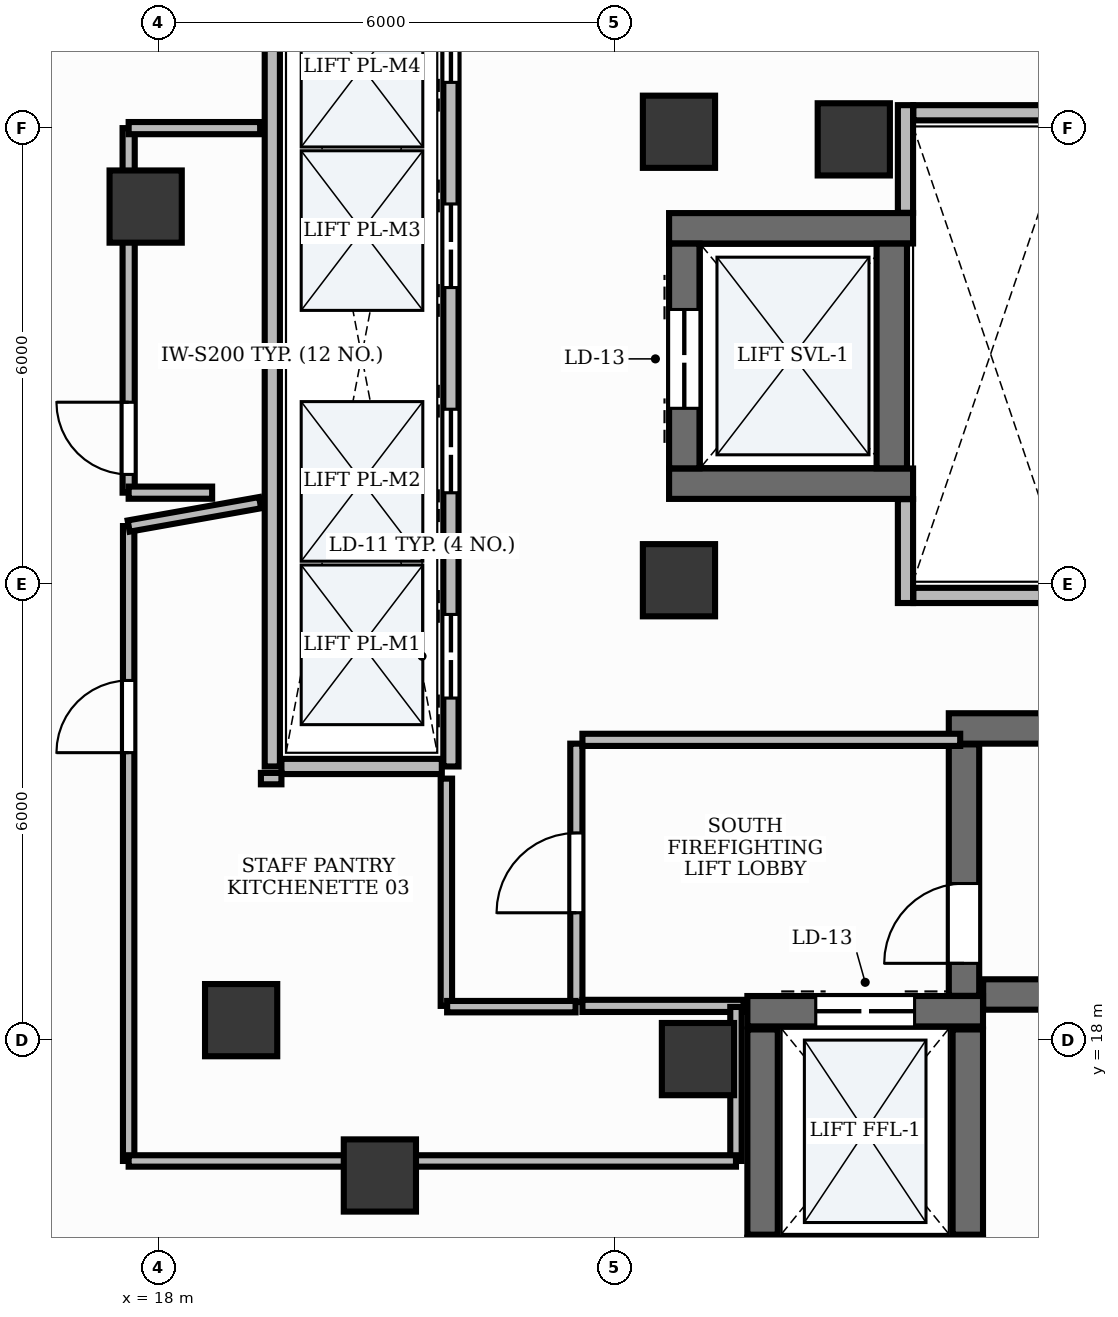
"""IFC4 building model, lengths in metres.
Left out: names, types, materials, properties, quantities, classifications, styles, units other than length and angle.
Written with IfcOpenShell. Run it as: python <this file> out.ifc"""

import sys

from ifc_helpers import new_model, si_unit, direction, frame, frame_2d, origin, origin_2d, place, context, subcontext, project, spatial, rectangle, extrude, element, fill, save


model = new_model("IFC4")
c1 = context("Model", 3, precision=1e-05, world=origin(), true_north=direction((0.0, 1.0)))
c2 = subcontext(c1, "Body", "Model", "MODEL_VIEW")
j1 = project(units=[si_unit("LENGTHUNIT", "METRE"), si_unit("PLANEANGLEUNIT", "RADIAN")], contexts=[c1])
p1 = place(None, origin())
s1 = spatial("IfcSite", under=j1, at=p1, CompositionType="ELEMENT")
p2 = place(p1, origin())
s2 = spatial("IfcBuilding", under=s1, at=p2, CompositionType="ELEMENT")
p3 = place(p2, frame((0.0, 0.0, 260.4)))
s3 = spatial("IfcBuildingStorey", under=s2, at=p3, CompositionType="ELEMENT", Elevation=260.4)
p4 = place(p3, frame((28.852, 18.6, 0.0), z_axis=(0.0, 0.0, 1.0), x_axis=(1.0, 0.0, 0.0)))
e1 = element("IfcWall", 1, at=p4, inside=s3, PredefinedType="SHEAR", context=c2, shape_type="SweptSolid", body=[
    extrude(rectangle(XDim=8.198, YDim=0.4, at=frame_2d((4.099, 0.0))), origin(), (0.0, 0.0, 1.0), 3.9),
])
p5 = place(p3, frame((28.4, 22.1, 0.0), z_axis=(0.0, 0.0, 1.0), x_axis=(1.0, 0.0, 0.0)))
e2 = element("IfcWall", 2, at=p5, inside=s3, PredefinedType="SHEAR", context=c2, shape_type="SweptSolid", body=[
    extrude(rectangle(XDim=8.65, YDim=0.4, at=frame_2d((4.325, 0.0))), origin(), (0.0, 0.0, 1.0), 3.9),
])
p6 = place(p3, frame((28.6, 18.582, 0.0), z_axis=(0.0, 0.0, 1.0), x_axis=(0.0, 1.0, 0.0)))
e3 = element("IfcWall", 3, at=p6, inside=s3, PredefinedType="SHEAR", context=c2, shape_type="SweptSolid", body=[
    extrude(rectangle(XDim=3.308, YDim=0.4, at=frame_2d((1.654, 0.0))), origin(), (0.0, 0.0, 1.0), 3.9),
])
p7 = place(p6, frame((0.428, 0.0, 0.0)))
e4 = element("IfcOpeningElement", 4, at=p7, cuts=e3, PredefinedType="OPENING", context=c2, shape_type="SweptSolid", body=[
    extrude(rectangle(XDim=1.05, YDim=2.15, at=frame_2d((0.525, 1.075))), frame((0.0, 0.215, 0.0), z_axis=(0.0, -1.0, 0.0), x_axis=(1.0, 0.0, 0.0)), (0.0, 0.0, 1.0), 0.43),
])
p8 = place(p3, frame((25.75, 18.38, 0.0), z_axis=(0.0, 0.0, 1.0), x_axis=(1.0, 0.0, 0.0)))
e5 = element("IfcWall", 5, at=p8, inside=s3, PredefinedType="SHEAR", context=c2, shape_type="SweptSolid", body=[
    extrude(rectangle(XDim=3.1, YDim=0.4, at=frame_2d((1.55, 0.0))), origin(), (0.0, 0.0, 1.0), 3.9),
])
p9 = place(p8, frame((0.9, 0.0, 0.0)))
e6 = element("IfcOpeningElement", 6, at=p9, cuts=e5, PredefinedType="OPENING", context=c2, shape_type="SweptSolid", body=[
    extrude(rectangle(XDim=1.3, YDim=2.2, at=frame_2d((0.65, 1.1))), frame((0.0, 0.215, 0.0), z_axis=(0.0, -1.0, 0.0), x_axis=(1.0, 0.0, 0.0)), (0.0, 0.0, 1.0), 0.43),
])
for number, where, z_axis, x_axis in (
    (7, (25.95, 15.44, 0.0), (0.0, 0.0, 1.0), (0.0, 1.0, 0.0)),
    (8, (28.65, 15.44, 0.0), (0.0, 0.0, 1.0), (0.0, 1.0, 0.0)),
):
    element("IfcWall", number, at=place(p3, frame(where, z_axis=z_axis, x_axis=x_axis)), inside=s3, PredefinedType="SHEAR", context=c2, shape_type="SweptSolid", body=[
        extrude(rectangle(XDim=2.7, YDim=0.4, at=frame_2d((1.35, 0.0))), origin(), (0.0, 0.0, 1.0), 3.9),
    ])
for number, where, z_axis, x_axis in (
    (9, (24.72, 28.68, 0.0), (0.0, 0.0, 1.0), (1.0, 0.0, 0.0)),
    (10, (24.72, 25.32, 0.0), (0.0, 0.0, 1.0), (1.0, 0.0, 0.0)),
):
    element("IfcWall", number, at=place(p3, frame(where, z_axis=z_axis, x_axis=x_axis)), inside=s3, PredefinedType="SHEAR", context=c2, shape_type="SweptSolid", body=[
        extrude(rectangle(XDim=3.21, YDim=0.4, at=frame_2d((1.605, 0.0))), origin(), (0.0, 0.0, 1.0), 3.9),
    ])
p10 = place(p3, frame((24.92, 25.522, 0.0), z_axis=(0.0, 0.0, 1.0), x_axis=(0.0, 1.0, 0.0)))
e11 = element("IfcWall", 11, at=p10, inside=s3, PredefinedType="SHEAR", context=c2, shape_type="SweptSolid", body=[
    extrude(rectangle(XDim=2.956, YDim=0.4, at=frame_2d((1.478, 0.0))), origin(), (0.0, 0.0, 1.0), 3.9),
])
p11 = place(p10, frame((0.79, 0.0, 0.0)))
e12 = element("IfcOpeningElement", 12, at=p11, cuts=e11, PredefinedType="OPENING", context=c2, shape_type="SweptSolid", body=[
    extrude(rectangle(XDim=1.3, YDim=2.2, at=frame_2d((0.65, 1.1))), frame((0.0, 0.215, 0.0), z_axis=(0.0, -1.0, 0.0), x_axis=(1.0, 0.0, 0.0)), (0.0, 0.0, 1.0), 0.43),
])
p12 = place(p3, frame((27.65, 25.522, 0.0), z_axis=(0.0, 0.0, 1.0), x_axis=(0.0, 1.0, 0.0)))
e13 = element("IfcWall", 13, at=p12, inside=s3, PredefinedType="SHEAR", context=c2, shape_type="SweptSolid", body=[
    extrude(rectangle(XDim=2.956, YDim=0.4, at=frame_2d((1.478, 0.0))), origin(), (0.0, 0.0, 1.0), 3.9),
])
for number, where, z_axis, x_axis in (
    (14, (24.85, 29.95, -0.0), (0.0, 0.0, 1.0), (1.0, 0.0, 0.0)),
    (15, (27.15, 29.85, -0.0), (0.0, 0.0, 1.0), (1.0, 0.0, 0.0)),
    (16, (24.85, 24.05, -0.0), (0.0, 0.0, 1.0), (1.0, 0.0, 0.0)),
    (17, (25.1, 17.75, -0.0), (0.0, 0.0, 1.0), (1.0, 0.0, 0.0)),
):
    element("IfcColumn", number, at=place(p3, frame(where, z_axis=z_axis, x_axis=x_axis)), inside=s3, PredefinedType="PILASTER", context=c2, shape_type="SweptSolid", body=[
        extrude(rectangle(XDim=0.95, YDim=0.95, at=origin_2d()), origin(), (0.0, 0.0, 1.0), 3.901),
    ])
for number, where, z_axis, x_axis in (
    (18, (17.834, 28.966, -0.0), (0.0, 0.0, 1.0), (1.0, 0.0, 0.0)),
    (19, (19.09, 18.262, -0.0), (0.0, 0.0, 1.0), (1.0, 0.0, 0.0)),
    (20, (20.915, 16.219, -0.0), (0.0, 0.0, 1.0), (1.0, 0.0, 0.0)),
):
    element("IfcColumn", number, at=place(p3, frame(where, z_axis=z_axis, x_axis=x_axis)), inside=s3, PredefinedType="COLUMN", context=c2, shape_type="SweptSolid", body=[
        extrude(rectangle(XDim=0.95, YDim=0.95, at=origin_2d()), origin(), (0.0, 0.0, 1.0), 3.901),
    ])
p13 = place(p3, frame((19.5, 21.6, 0.0), z_axis=(0.0, 0.0, 1.0), x_axis=(0.0, 1.0, 0.0)))
e21 = element("IfcWall", 21, at=p13, inside=s3, PredefinedType="PARTITIONING", context=c2, shape_type="SweptSolid", body=[
    extrude(rectangle(XDim=10.8, YDim=0.2, at=frame_2d((5.4, 0.0))), origin(), (0.0, 0.0, 1.0), 2.91),
])
p14 = place(p3, frame((21.85, 21.6, 0.0), z_axis=(0.0, 0.0, 1.0), x_axis=(0.0, 1.0, 0.0)))
e22 = element("IfcWall", 22, at=p14, inside=s3, PredefinedType="PARTITIONING", context=c2, shape_type="SweptSolid", body=[
    extrude(rectangle(XDim=10.8, YDim=0.2, at=frame_2d((5.4, 0.0))), origin(), (0.0, 0.0, 1.0), 2.91),
])
p15 = place(p14, frame((0.9, 0.0, 0.0)))
e23 = element("IfcOpeningElement", 23, at=p15, cuts=e22, PredefinedType="OPENING", context=c2, shape_type="SweptSolid", body=[
    extrude(rectangle(XDim=1.1, YDim=2.2, at=frame_2d((0.55, 1.1))), frame((0.0, 0.115, 0.0), z_axis=(0.0, -1.0, 0.0), x_axis=(1.0, 0.0, 0.0)), (0.0, 0.0, 1.0), 0.23),
])
p16 = place(p14, frame((3.6, 0.0, 0.0)))
e24 = element("IfcOpeningElement", 24, at=p16, cuts=e22, PredefinedType="OPENING", context=c2, shape_type="SweptSolid", body=[
    extrude(rectangle(XDim=1.1, YDim=2.2, at=frame_2d((0.55, 1.1))), frame((0.0, 0.115, 0.0), z_axis=(0.0, -1.0, 0.0), x_axis=(1.0, 0.0, 0.0)), (0.0, 0.0, 1.0), 0.23),
])
p17 = place(p14, frame((6.3, 0.0, 0.0)))
e25 = element("IfcOpeningElement", 25, at=p17, cuts=e22, PredefinedType="OPENING", context=c2, shape_type="SweptSolid", body=[
    extrude(rectangle(XDim=1.1, YDim=2.2, at=frame_2d((0.55, 1.1))), frame((0.0, 0.115, 0.0), z_axis=(0.0, -1.0, 0.0), x_axis=(1.0, 0.0, 0.0)), (0.0, 0.0, 1.0), 0.23),
])
p18 = place(p14, frame((9.0, 0.0, 0.0)))
e26 = element("IfcOpeningElement", 26, at=p18, cuts=e22, PredefinedType="OPENING", context=c2, shape_type="SweptSolid", body=[
    extrude(rectangle(XDim=1.1, YDim=2.2, at=frame_2d((0.55, 1.1))), frame((0.0, 0.115, 0.0), z_axis=(0.0, -1.0, 0.0), x_axis=(1.0, 0.0, 0.0)), (0.0, 0.0, 1.0), 0.23),
])
p19 = place(p3, frame((19.62, 21.6, 0.0), z_axis=(0.0, 0.0, 1.0), x_axis=(1.0, 0.0, 0.0)))
e27 = element("IfcWall", 27, at=p19, inside=s3, PredefinedType="PARTITIONING", context=c2, shape_type="SweptSolid", body=[
    extrude(rectangle(XDim=2.11, YDim=0.2, at=frame_2d((1.055, 0.0))), origin(), (0.0, 0.0, 1.0), 2.91),
])
p20 = place(p3, frame((27.83, 23.75, 0.0), z_axis=(0.0, 0.0, 1.0), x_axis=(0.0, 1.0, 0.0)))
e28 = element("IfcWall", 28, at=p20, inside=s3, PredefinedType="PARTITIONING", context=c2, shape_type="SweptSolid", body=[
    extrude(rectangle(XDim=1.366, YDim=0.2, at=frame_2d((0.683, 0.0))), origin(), (0.0, 0.0, 1.0), 2.91),
])
p21 = place(p3, frame((27.83, 28.884, 0.0), z_axis=(0.0, 0.0, 1.0), x_axis=(0.0, 1.0, 0.0)))
e29 = element("IfcWall", 29, at=p21, inside=s3, PredefinedType="PARTITIONING", context=c2, shape_type="SweptSolid", body=[
    extrude(rectangle(XDim=1.416, YDim=0.2, at=frame_2d((0.708, 0.0))), origin(), (0.0, 0.0, 1.0), 2.91),
])
for number, where, z_axis, x_axis in (
    (30, (27.934, 23.85, 0.0), (0.0, 0.0, 1.0), (1.0, 0.0, 0.0)),
    (31, (27.934, 30.2, 0.0), (0.0, 0.0, 1.0), (1.0, 0.0, 0.0)),
):
    element("IfcWall", number, at=place(p3, frame(where, z_axis=z_axis, x_axis=x_axis)), inside=s3, PredefinedType="PARTITIONING", context=c2, shape_type="SweptSolid", body=[
        extrude(rectangle(XDim=2.096, YDim=0.2, at=frame_2d((1.048, 0.0))), origin(), (0.0, 0.0, 1.0), 2.91),
    ])
p22 = place(p3, frame((23.5, 18.5, 0.0), z_axis=(0.0, 0.0, 1.0), x_axis=(0.0, 1.0, 0.0)))
e32 = element("IfcWall", 32, at=p22, inside=s3, PredefinedType="PARTITIONING", context=c2, shape_type="SweptSolid", body=[
    extrude(rectangle(XDim=3.4, YDim=0.16, at=frame_2d((1.7, 0.0))), origin(), (0.0, 0.0, 1.0), 2.91),
])
p23 = place(p22, frame((1.175, 0.0, 0.0)))
e33 = element("IfcOpeningElement", 33, at=p23, cuts=e32, PredefinedType="OPENING", context=c2, shape_type="SweptSolid", body=[
    extrude(rectangle(XDim=1.05, YDim=2.15, at=frame_2d((0.525, 1.075))), frame((0.0, 0.095, 0.0), z_axis=(0.0, -1.0, 0.0), x_axis=(1.0, 0.0, 0.0)), (0.0, 0.0, 1.0), 0.19),
])
p24 = place(p3, frame((23.58, 21.95, 0.0), z_axis=(0.0, 0.0, 1.0), x_axis=(1.0, 0.0, 0.0)))
e34 = element("IfcWall", 34, at=p24, inside=s3, PredefinedType="PARTITIONING", context=c2, shape_type="SweptSolid", body=[
    extrude(rectangle(XDim=4.97, YDim=0.16, at=frame_2d((2.485, 0.0))), origin(), (0.0, 0.0, 1.0), 2.91),
])
p25 = place(p3, frame((23.58, 18.45, 0.0), z_axis=(0.0, 0.0, 1.0), x_axis=(1.0, 0.0, 0.0)))
e35 = element("IfcWall", 35, at=p25, inside=s3, PredefinedType="PARTITIONING", context=c2, shape_type="SweptSolid", body=[
    extrude(rectangle(XDim=2.12, YDim=0.16, at=frame_2d((1.06, 0.0))), origin(), (0.0, 0.0, 1.0), 2.91),
])
p26 = place(p3, frame((17.61, 16.41, 0.0), z_axis=(0.0, 0.0, 1.0), x_axis=(0.0, 1.0, 0.0)))
e36 = element("IfcWall", 36, at=p26, inside=s3, PredefinedType="PARTITIONING", context=c2, shape_type="SweptSolid", body=[
    extrude(rectangle(XDim=8.353, YDim=0.15, at=frame_2d((4.176, 0.0))), origin(), (0.0, 0.0, 1.0), 2.91),
])
p27 = place(p26, frame((5.371, 0.0, 0.0)))
e37 = element("IfcOpeningElement", 37, at=p27, cuts=e36, PredefinedType="OPENING", context=c2, shape_type="SweptSolid", body=[
    extrude(rectangle(XDim=0.95, YDim=2.15, at=frame_2d((0.475, 1.075))), frame((0.0, 0.09, 0.0), z_axis=(0.0, -1.0, 0.0), x_axis=(1.0, 0.0, 0.0)), (0.0, 0.0, 1.0), 0.18),
])
p28 = place(p3, frame((17.61, 25.202, 0.0), z_axis=(0.0, 0.0, 1.0), x_axis=(0.0, 1.0, 0.0)))
e38 = element("IfcWall", 38, at=p28, inside=s3, PredefinedType="PARTITIONING", context=c2, shape_type="SweptSolid", body=[
    extrude(rectangle(XDim=4.796, YDim=0.16, at=frame_2d((2.398, 0.0))), origin(), (0.0, 0.0, 1.0), 2.91),
])
p29 = place(p28, frame((0.24, 0.0, 0.0)))
e39 = element("IfcOpeningElement", 39, at=p29, cuts=e38, PredefinedType="OPENING", context=c2, shape_type="SweptSolid", body=[
    extrude(rectangle(XDim=0.95, YDim=2.15, at=frame_2d((0.475, 1.075))), frame((0.0, 0.095, 0.0), z_axis=(0.0, -1.0, 0.0), x_axis=(1.0, 0.0, 0.0)), (0.0, 0.0, 1.0), 0.19),
])
p30 = place(p3, frame((19.35, 21.44, 0.0), z_axis=(0.0, 0.0, 1.0), x_axis=(1.0, 0.0, 0.0)))
e40 = element("IfcWall", 40, at=p30, inside=s3, PredefinedType="PARTITIONING", context=c2, shape_type="SweptSolid", body=[
    extrude(rectangle(XDim=0.27, YDim=0.15, at=frame_2d((0.135, 0.0))), origin(), (0.0, 0.0, 1.0), 2.91),
])
p31 = place(p3, frame((21.79, 21.44, 0.0), z_axis=(0.0, 0.0, 1.0), x_axis=(0.0, -1.0, 0.0)))
e41 = element("IfcWall", 41, at=p31, inside=s3, PredefinedType="PARTITIONING", context=c2, shape_type="SweptSolid", body=[
    extrude(rectangle(XDim=2.99, YDim=0.15, at=frame_2d((1.495, 0.0))), origin(), (0.0, 0.0, 1.0), 2.91),
])
p32 = place(p3, frame((21.8, 18.44, 0.0), z_axis=(0.0, 0.0, 1.0), x_axis=(1.0, 0.0, 0.0)))
e42 = element("IfcWall", 42, at=p32, inside=s3, PredefinedType="PARTITIONING", context=c2, shape_type="SweptSolid", body=[
    extrude(rectangle(XDim=1.69, YDim=0.15, at=frame_2d((0.845, 0.0))), origin(), (0.0, 0.0, 1.0), 2.91),
])
p33 = place(p3, frame((25.6, 18.436, 0.0), z_axis=(0.0, 0.0, 1.0), x_axis=(0.0, -1.0, 0.0)))
e43 = element("IfcWall", 43, at=p33, inside=s3, PredefinedType="PARTITIONING", context=c2, shape_type="SweptSolid", body=[
    extrude(rectangle(XDim=2.026, YDim=0.15, at=frame_2d((1.013, 0.0))), origin(), (0.0, 0.0, 1.0), 2.91),
])
p34 = place(p3, frame((25.6, 16.41, 0.0), z_axis=(0.0, 0.0, 1.0), x_axis=(-1.0, 0.0, 0.0)))
e44 = element("IfcWall", 44, at=p34, inside=s3, PredefinedType="PARTITIONING", context=c2, shape_type="SweptSolid", body=[
    extrude(rectangle(XDim=7.99, YDim=0.15, at=frame_2d((3.995, 0.0))), origin(), (0.0, 0.0, 1.0), 2.91),
])
p35 = place(p3, frame((17.61, 24.763, 0.0), z_axis=(0.0, 0.0, 1.0), x_axis=(0.984503916892, 0.175362589008, 0.0)))
e45 = element("IfcWall", 45, at=p35, inside=s3, PredefinedType="PARTITIONING", context=c2, shape_type="SweptSolid", body=[
    extrude(rectangle(XDim=1.757, YDim=0.15, at=frame_2d((0.878, 0.0))), origin(), (0.0, 0.0, 1.0), 2.91),
])
p36 = place(p3, frame((18.708, 25.202, 0.0), z_axis=(0.0, 0.0, 1.0), x_axis=(-1.0, 0.0, 0.0)))
e46 = element("IfcWall", 46, at=p36, inside=s3, PredefinedType="PARTITIONING", context=c2, shape_type="SweptSolid", body=[
    extrude(rectangle(XDim=1.098, YDim=0.16, at=frame_2d((0.549, 0.0))), origin(), (0.0, 0.0, 1.0), 2.91),
])
p37 = place(p3, frame((17.61, 29.998, 0.0), z_axis=(0.0, 0.0, 1.0), x_axis=(1.0, 0.0, 0.0)))
e47 = element("IfcWall", 47, at=p37, inside=s3, PredefinedType="PARTITIONING", context=c2, shape_type="SweptSolid", body=[
    extrude(rectangle(XDim=1.73, YDim=0.16, at=frame_2d((0.865, 0.0))), origin(), (0.0, 0.0, 1.0), 2.91),
])
p38 = place(p7, origin())
e48 = element("IfcDoor", 48, at=p38, inside=s3, OperationType="SINGLE_SWING_LEFT", PredefinedType="DOOR", context=c2, shape_type="SweptSolid", body=[
    extrude(rectangle(XDim=1.05, YDim=2.15, at=frame_2d((0.525, 1.075))), frame((0.0, 0.025, 0.0), z_axis=(0.0, -1.0, 0.0), x_axis=(1.0, 0.0, 0.0)), (0.0, 0.0, 1.0), 0.05),
])
fill(e4, e48)
p39 = place(p15, origin())
e49 = element("IfcDoor", 49, at=p39, inside=s3, OperationType="DOUBLE_DOOR_SLIDING", PredefinedType="DOOR", context=c2, shape_type="SweptSolid", body=[
    extrude(rectangle(XDim=1.1, YDim=2.2, at=frame_2d((0.55, 1.1))), frame((0.0, 0.025, 0.0), z_axis=(0.0, -1.0, 0.0), x_axis=(1.0, 0.0, 0.0)), (0.0, 0.0, 1.0), 0.05),
])
fill(e23, e49)
p40 = place(p16, origin())
e50 = element("IfcDoor", 50, at=p40, inside=s3, OperationType="DOUBLE_DOOR_SLIDING", PredefinedType="DOOR", context=c2, shape_type="SweptSolid", body=[
    extrude(rectangle(XDim=1.1, YDim=2.2, at=frame_2d((0.55, 1.1))), frame((0.0, 0.025, 0.0), z_axis=(0.0, -1.0, 0.0), x_axis=(1.0, 0.0, 0.0)), (0.0, 0.0, 1.0), 0.05),
])
fill(e24, e50)
p41 = place(p17, origin())
e51 = element("IfcDoor", 51, at=p41, inside=s3, OperationType="DOUBLE_DOOR_SLIDING", PredefinedType="DOOR", context=c2, shape_type="SweptSolid", body=[
    extrude(rectangle(XDim=1.1, YDim=2.2, at=frame_2d((0.55, 1.1))), frame((0.0, 0.025, 0.0), z_axis=(0.0, -1.0, 0.0), x_axis=(1.0, 0.0, 0.0)), (0.0, 0.0, 1.0), 0.05),
])
fill(e25, e51)
p42 = place(p18, origin())
e52 = element("IfcDoor", 52, at=p42, inside=s3, OperationType="DOUBLE_DOOR_SLIDING", PredefinedType="DOOR", context=c2, shape_type="SweptSolid", body=[
    extrude(rectangle(XDim=1.1, YDim=2.2, at=frame_2d((0.55, 1.1))), frame((0.0, 0.025, 0.0), z_axis=(0.0, -1.0, 0.0), x_axis=(1.0, 0.0, 0.0)), (0.0, 0.0, 1.0), 0.05),
])
fill(e26, e52)
p43 = place(p9, origin())
e53 = element("IfcDoor", 53, at=p43, inside=s3, OperationType="DOUBLE_DOOR_SLIDING", PredefinedType="DOOR", context=c2, shape_type="SweptSolid", body=[
    extrude(rectangle(XDim=1.3, YDim=2.2, at=frame_2d((0.65, 1.1))), frame((0.0, 0.025, 0.0), z_axis=(0.0, -1.0, 0.0), x_axis=(1.0, 0.0, 0.0)), (0.0, 0.0, 1.0), 0.05),
])
fill(e6, e53)
p44 = place(p11, origin())
e54 = element("IfcDoor", 54, at=p44, inside=s3, OperationType="DOUBLE_DOOR_SLIDING", PredefinedType="DOOR", context=c2, shape_type="SweptSolid", body=[
    extrude(rectangle(XDim=1.3, YDim=2.2, at=frame_2d((0.65, 1.1))), frame((0.0, 0.025, 0.0), z_axis=(0.0, -1.0, 0.0), x_axis=(1.0, 0.0, 0.0)), (0.0, 0.0, 1.0), 0.05),
])
fill(e12, e54)
p45 = place(p23, origin())
e55 = element("IfcDoor", 55, at=p45, inside=s3, OperationType="SINGLE_SWING_LEFT", PredefinedType="DOOR", context=c2, shape_type="SweptSolid", body=[
    extrude(rectangle(XDim=1.05, YDim=2.15, at=frame_2d((0.525, 1.075))), frame((0.0, 0.025, 0.0), z_axis=(0.0, -1.0, 0.0), x_axis=(1.0, 0.0, 0.0)), (0.0, 0.0, 1.0), 0.05),
])
fill(e33, e55)
p46 = place(p27, origin())
e56 = element("IfcDoor", 56, at=p46, inside=s3, OperationType="SINGLE_SWING_LEFT", PredefinedType="DOOR", context=c2, shape_type="SweptSolid", body=[
    extrude(rectangle(XDim=0.95, YDim=2.15, at=frame_2d((0.475, 1.075))), frame((0.0, 0.025, 0.0), z_axis=(0.0, -1.0, 0.0), x_axis=(1.0, 0.0, 0.0)), (0.0, 0.0, 1.0), 0.05),
])
fill(e37, e56)
p47 = place(p29, origin())
e57 = element("IfcDoor", 57, at=p47, inside=s3, OperationType="SINGLE_SWING_RIGHT", PredefinedType="DOOR", context=c2, shape_type="SweptSolid", body=[
    extrude(rectangle(XDim=0.95, YDim=2.15, at=frame_2d((0.475, 1.075))), frame((0.0, 0.025, 0.0), z_axis=(0.0, -1.0, 0.0), x_axis=(1.0, 0.0, 0.0)), (0.0, 0.0, 1.0), 0.05),
])
fill(e39, e57)
save(model, sys.argv[1])
